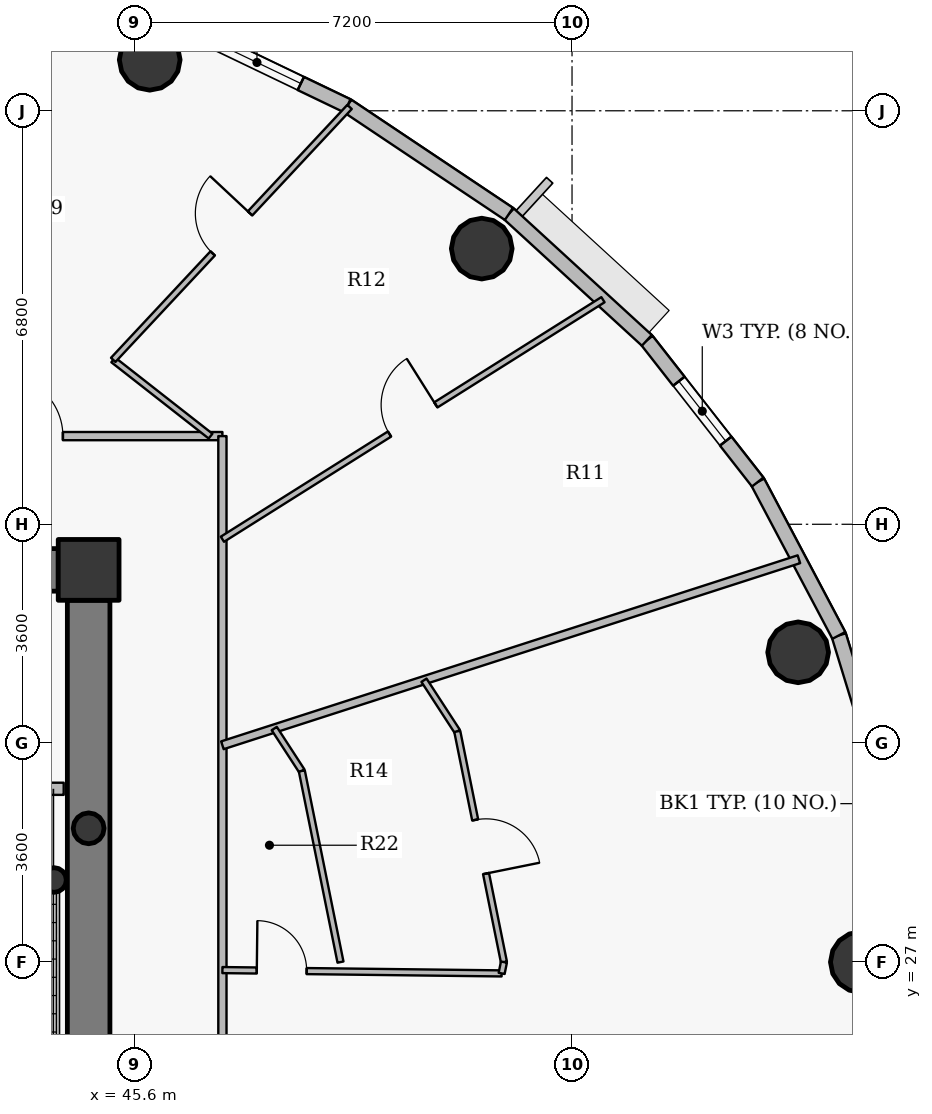
"""IFC4 building model, lengths in metres.
Left out: names, types, materials, properties, quantities, classifications, styles, units other than length and angle.
Written with IfcOpenShell. Run it as: python <this file> out.ifc"""

import sys

from ifc_helpers import new_model, si_unit, direction, frame, frame_2d, origin, origin_2d, place, context, subcontext, project, spatial, rectangle, hollow_circle, extrude, source, transform, mapped, element, fill, save


model = new_model("IFC4")
c1 = context("Model", 3, precision=1e-05, world=origin(), true_north=direction((0.0, 1.0)))
c2 = subcontext(c1, "Body", "Model", "MODEL_VIEW")
j1 = project(units=[si_unit("LENGTHUNIT", "METRE"), si_unit("PLANEANGLEUNIT", "RADIAN")], contexts=[c1])
p1 = place(None, origin())
s1 = spatial("IfcSite", under=j1, at=p1, CompositionType="ELEMENT")
p2 = place(p1, origin())
s2 = spatial("IfcBuilding", under=s1, at=p2, CompositionType="ELEMENT")
p3 = place(p2, frame((0.0, 0.0, 299.25)))
s3 = spatial("IfcBuildingStorey", under=s2, at=p3, CompositionType="ELEMENT", Elevation=299.25)
p4 = place(p3, frame((44.85, 33.45, 0.0), z_axis=(0.0, 0.0, 1.0), x_axis=(1.0, 0.0, 0.0)))
e1 = element("IfcColumn", 1, at=p4, inside=s3, PredefinedType="COLUMN", context=c2, shape_type="SweptSolid", body=[
    extrude(rectangle(XDim=1.0, YDim=1.0, at=origin_2d()), origin(), (0.0, 0.0, 1.0), 3.75),
])
p5 = place(p3, frame((44.28, 28.35, 0.0), z_axis=(0.0, 0.0, 1.0), x_axis=(1.0, 0.0, 0.0)))
e2 = element("IfcColumn", 2, at=p5, inside=s3, PredefinedType="COLUMN", context=c2, shape_type="SweptSolid", body=[
    extrude(hollow_circle(Radius=0.203, WallThickness=0.016, at=origin_2d()), origin(), (0.0, 0.0, 1.0), 3.75),
])
p6 = place(p3, frame((27.65, 33.45, 0.0), z_axis=(0.0, 0.0, 1.0), x_axis=(1.0, 0.0, 0.0)))
e3 = element("IfcWall", 3, at=p6, inside=s3, PredefinedType="SHEAR", context=c2, shape_type="SweptSolid", body=[
    extrude(rectangle(XDim=16.7, YDim=0.7, at=frame_2d((8.35, 0.0))), origin(), (0.0, 0.0, 1.0), 3.05),
])
p7 = place(p6, frame((12.775, 0.0, 0.0)))
e4 = element("IfcOpeningElement", 4, at=p7, cuts=e3, PredefinedType="OPENING", context=c2, shape_type="SweptSolid", body=[
    extrude(rectangle(XDim=1.15, YDim=2.15, at=origin_2d()), frame((0.575, 0.36, 1.075), z_axis=(0.0, -1.0, 0.0), x_axis=(1.0, 0.0, 0.0)), (0.0, 0.0, 1.0), 0.72),
])
p8 = place(p3, frame((44.85, 32.95, 0.0), z_axis=(0.0, 0.0, 1.0), x_axis=(0.0, -1.0, 0.0)))
e5 = element("IfcWall", 5, at=p8, inside=s3, PredefinedType="SHEAR", context=c2, shape_type="SweptSolid", body=[
    extrude(rectangle(XDim=11.9, YDim=0.7, at=frame_2d((5.95, 0.0))), origin(), (0.0, 0.0, 1.0), 3.05),
])
for number, where, z_axis, x_axis in (
    (6, (57.55, 27.0, 0.0), (0.0, 0.0, 1.0), (1.0, 0.0, 0.0)),
    (7, (56.519, 32.094, 0.0), (0.0, 0.0, 1.0), (1.0, 0.0, 0.0)),
    (8, (51.315, 38.733, 0.0), (0.0, 0.0, 1.0), (1.0, 0.0, 0.0)),
    (9, (45.854, 41.839, 0.0), (0.0, 0.0, 1.0), (1.0, 0.0, 0.0)),
):
    element("IfcColumn", number, at=place(p3, frame(where, z_axis=z_axis, x_axis=x_axis)), inside=s3, PredefinedType="COLUMN", context=c2, shape_type="SweptSolid", body=[
        extrude(hollow_circle(Radius=0.5, WallThickness=0.032, at=origin_2d()), origin(), (0.0, 0.0, 1.0), 3.75),
    ])
p9 = place(p3, frame((44.85, 29.2, 0.0), z_axis=(0.0, 0.0, 1.0), x_axis=(1.0, 0.0, 0.0)))
e10 = element("IfcColumn", 10, at=p9, inside=s3, PredefinedType="COLUMN", context=c2, shape_type="SweptSolid", body=[
    extrude(hollow_circle(Radius=0.254, WallThickness=0.02, at=origin_2d()), origin(), (0.0, 0.0, 1.0), 3.75),
])
p10 = place(p3, frame((57.188, 32.372, 0.0), z_axis=(0.0, 0.0, 1.0), x_axis=(0.2931213403, -0.956075248012, 0.0)))
e11 = element("IfcWall", 11, at=p10, inside=s3, PredefinedType="SOLIDWALL", context=c2, shape_type="SweptSolid", body=[
    extrude(rectangle(XDim=2.775, YDim=0.24, at=frame_2d((1.388, 0.0))), origin(), (0.0, 0.0, 1.0), 3.5),
])
p11 = place(p3, frame((55.854, 34.895, 0.0), z_axis=(0.0, 0.0, 1.0), x_axis=(0.467628269026, -0.883925224218, 0.0)))
e12 = element("IfcWall", 12, at=p11, inside=s3, PredefinedType="SOLIDWALL", context=c2, shape_type="SweptSolid", body=[
    extrude(rectangle(XDim=2.854, YDim=0.24, at=frame_2d((1.427, 0.0))), origin(), (0.0, 0.0, 1.0), 3.5),
])
p12 = place(p3, frame((54.03, 37.225, 0.0), z_axis=(0.0, 0.0, 1.0), x_axis=(0.616337186556, -0.787482363275, 0.0)))
e13 = element("IfcWall", 13, at=p12, inside=s3, PredefinedType="SOLIDWALL", context=c2, shape_type="SweptSolid", body=[
    extrude(rectangle(XDim=2.958, YDim=0.24, at=frame_2d((1.479, 0.0))), origin(), (0.0, 0.0, 1.0), 3.5),
])
p13 = place(p12, frame((0.854, 0.0, 0.9)))
e14 = element("IfcOpeningElement", 14, at=p13, cuts=e13, PredefinedType="OPENING", context=c2, shape_type="SweptSolid", body=[
    extrude(rectangle(XDim=1.25, YDim=1.65, at=origin_2d()), frame((0.625, 0.13, 0.825), z_axis=(0.0, -1.0, 0.0), x_axis=(1.0, 0.0, 0.0)), (0.0, 0.0, 1.0), 0.26),
])
p14 = place(p3, frame((51.762, 39.304, 0.0), z_axis=(0.0, 0.0, 1.0), x_axis=(0.737068506972, -0.675818034703, 0.0)))
e15 = element("IfcWall", 15, at=p14, inside=s3, PredefinedType="SOLIDWALL", context=c2, shape_type="SweptSolid", body=[
    extrude(rectangle(XDim=3.077, YDim=0.24, at=frame_2d((1.539, 0.0))), origin(), (0.0, 0.0, 1.0), 3.5),
])
p15 = place(p3, frame((49.104, 41.082, 0.0), z_axis=(0.0, 0.0, 1.0), x_axis=(0.831250592635, -0.55589787933, 0.0)))
e16 = element("IfcWall", 16, at=p15, inside=s3, PredefinedType="SOLIDWALL", context=c2, shape_type="SweptSolid", body=[
    extrude(rectangle(XDim=3.197, YDim=0.24, at=frame_2d((1.599, 0.0))), origin(), (0.0, 0.0, 1.0), 3.5),
])
p16 = place(p3, frame((46.123, 42.512, 0.0), z_axis=(0.0, 0.0, 1.0), x_axis=(0.901573741254, -0.43262546051, 0.0)))
e17 = element("IfcWall", 17, at=p16, inside=s3, PredefinedType="SOLIDWALL", context=c2, shape_type="SweptSolid", body=[
    extrude(rectangle(XDim=3.307, YDim=0.24, at=frame_2d((1.653, 0.0))), origin(), (0.0, 0.0, 1.0), 3.5),
])
p17 = place(p16, frame((0.858, 0.0, 0.9)))
e18 = element("IfcOpeningElement", 18, at=p17, cuts=e17, PredefinedType="OPENING", context=c2, shape_type="SweptSolid", body=[
    extrude(rectangle(XDim=1.6, YDim=1.75, at=origin_2d()), frame((0.8, 0.13, 0.875), z_axis=(0.0, -1.0, 0.0), x_axis=(1.0, 0.0, 0.0)), (0.0, 0.0, 1.0), 0.26),
])
p18 = place(p3, frame((35.95, 29.85, 0.0), z_axis=(0.0, 0.0, 1.0), x_axis=(1.0, 0.0, 0.0)))
e19 = element("IfcWall", 19, at=p18, inside=s3, PredefinedType="PARTITIONING", context=c2, shape_type="SweptSolid", body=[
    extrude(rectangle(XDim=8.49, YDim=0.2, at=frame_2d((4.245, 0.0))), origin(), (0.0, 0.0, 1.0), 3.085),
])
p19 = place(p18, frame((6.1, 0.0, 0.0)))
e20 = element("IfcOpeningElement", 20, at=p19, cuts=e19, PredefinedType="OPENING", context=c2, shape_type="SweptSolid", body=[
    extrude(rectangle(XDim=1.2, YDim=2.15, at=origin_2d()), frame((0.6, 0.11, 1.075), z_axis=(0.0, -1.0, 0.0), x_axis=(1.0, 0.0, 0.0)), (0.0, 0.0, 1.0), 0.22),
])
p20 = place(p18, frame((0.37, 0.0, 0.0)))
e21 = element("IfcOpeningElement", 21, at=p20, cuts=e19, PredefinedType="OPENING", context=c2, shape_type="SweptSolid", body=[
    extrude(rectangle(XDim=1.15, YDim=2.15, at=origin_2d()), frame((0.575, 0.11, 1.075), z_axis=(0.0, -1.0, 0.0), x_axis=(1.0, 0.0, 0.0)), (0.0, 0.0, 1.0), 0.22),
])
p21 = place(p18, frame((2.425, 0.0, 0.0)))
e22 = element("IfcOpeningElement", 22, at=p21, cuts=e19, PredefinedType="OPENING", context=c2, shape_type="SweptSolid", body=[
    extrude(rectangle(XDim=1.05, YDim=2.15, at=origin_2d()), frame((0.525, 0.11, 1.075), z_axis=(0.0, -1.0, 0.0), x_axis=(1.0, 0.0, 0.0)), (0.0, 0.0, 1.0), 0.22),
])
p22 = place(p3, frame((36.95, 35.65, 0.0), z_axis=(0.0, 0.0, 1.0), x_axis=(1.0, 0.0, 0.0)))
e23 = element("IfcWall", 23, at=p22, inside=s3, PredefinedType="PARTITIONING", context=c2, shape_type="SweptSolid", body=[
    extrude(rectangle(XDim=10.1, YDim=0.135, at=frame_2d((5.05, 0.0))), origin(), (0.0, 0.0, 1.0), 3.035),
])
p23 = place(p22, frame((6.477, 0.0, 0.0)))
e24 = element("IfcOpeningElement", 24, at=p23, cuts=e23, PredefinedType="OPENING", context=c2, shape_type="SweptSolid", body=[
    extrude(rectangle(XDim=1.0, YDim=2.15, at=origin_2d()), frame((0.5, 0.078, 1.075), z_axis=(0.0, -1.0, 0.0), x_axis=(1.0, 0.0, 0.0)), (0.0, 0.0, 1.0), 0.155),
])
p24 = place(p3, frame((45.254, 36.904, 0.0), z_axis=(0.0, 0.0, 1.0), x_axis=(0.787350433025, -0.616505714179, 0.0)))
e25 = element("IfcWall", 25, at=p24, inside=s3, PredefinedType="PARTITIONING", context=c2, shape_type="SweptSolid", body=[
    extrude(rectangle(XDim=2.033, YDim=0.1, at=frame_2d((1.017, 0.0))), origin(), (0.0, 0.0, 1.0), 3.5),
])
p25 = place(p3, frame((45.254, 36.904, 0.0), z_axis=(0.0, 0.0, 1.0), x_axis=(0.682727638106, 0.73067295842, 0.0)))
e26 = element("IfcWall", 26, at=p25, inside=s3, PredefinedType="PARTITIONING", context=c2, shape_type="SweptSolid", body=[
    extrude(rectangle(XDim=5.693, YDim=0.1, at=frame_2d((2.846, 0.0))), origin(), (0.0, 0.0, 1.0), 2.985),
])
p26 = place(p25, frame((2.396, 0.0, 0.0)))
e27 = element("IfcOpeningElement", 27, at=p26, cuts=e26, PredefinedType="OPENING", context=c2, shape_type="SweptSolid", body=[
    extrude(rectangle(XDim=0.9, YDim=2.1, at=origin_2d()), frame((0.45, 0.06, 1.05), z_axis=(0.0, -1.0, 0.0), x_axis=(1.0, 0.0, 0.0)), (0.0, 0.0, 1.0), 0.12),
])
p27 = place(p3, frame((47.05, 18.35, 0.0), z_axis=(0.0, 0.0, 1.0), x_axis=(0.0, 1.0, 0.0)))
e28 = element("IfcWall", 28, at=p27, inside=s3, PredefinedType="PARTITIONING", context=c2, shape_type="SweptSolid", body=[
    extrude(rectangle(XDim=17.3, YDim=0.135, at=frame_2d((8.65, 0.0))), origin(), (0.0, 0.0, 1.0), 3.035),
])
p28 = place(p27, frame((6.155, 0.0, 0.0)))
e29 = element("IfcOpeningElement", 29, at=p28, cuts=e28, PredefinedType="OPENING", context=c2, shape_type="SweptSolid", body=[
    extrude(rectangle(XDim=1.0, YDim=2.15, at=origin_2d()), frame((0.5, 0.078, 1.075), z_axis=(0.0, -1.0, 0.0), x_axis=(1.0, 0.0, 0.0)), (0.0, 0.0, 1.0), 0.155),
])
p29 = place(p3, frame((47.05, 26.869, 0.0), z_axis=(0.0, 0.0, 1.0), x_axis=(0.999929100649, -0.011907714968, 0.0)))
e30 = element("IfcWall", 30, at=p29, inside=s3, PredefinedType="PARTITIONING", context=c2, shape_type="SweptSolid", body=[
    extrude(rectangle(XDim=4.593, YDim=0.1, at=frame_2d((2.296, 0.0))), origin(), (0.0, 0.0, 1.0), 3.035),
])
p30 = place(p29, frame((0.565, 0.0, 0.0)))
e31 = element("IfcOpeningElement", 31, at=p30, cuts=e30, PredefinedType="OPENING", context=c2, shape_type="SweptSolid", body=[
    extrude(rectangle(XDim=0.82, YDim=2.1, at=origin_2d()), frame((0.41, 0.06, 1.05), z_axis=(0.0, -1.0, 0.0), x_axis=(1.0, 0.0, 0.0)), (0.0, 0.0, 1.0), 0.12),
])
p31 = place(p3, frame((47.05, 30.565, 0.0), z_axis=(0.0, 0.0, 1.0), x_axis=(0.951682976888, 0.307082255269, 0.0)))
e32 = element("IfcWall", 32, at=p31, inside=s3, PredefinedType="PARTITIONING", context=c2, shape_type="SweptSolid", body=[
    extrude(rectangle(XDim=9.963, YDim=0.135, at=frame_2d((4.981, 0.0))), origin(), (0.0, 0.0, 1.0), 2.985),
])
p32 = place(p3, frame((47.05, 33.954, 0.0), z_axis=(0.0, 0.0, 1.0), x_axis=(0.846339777122, 0.532643390704, 0.0)))
e33 = element("IfcWall", 33, at=p32, inside=s3, PredefinedType="PARTITIONING", context=c2, shape_type="SweptSolid", body=[
    extrude(rectangle(XDim=7.395, YDim=0.1, at=frame_2d((3.698, 0.0))), origin(), (0.0, 0.0, 1.0), 2.985),
])
p33 = place(p32, frame((3.248, 0.0, 0.0)))
e34 = element("IfcOpeningElement", 34, at=p33, cuts=e33, PredefinedType="OPENING", context=c2, shape_type="SweptSolid", body=[
    extrude(rectangle(XDim=0.9, YDim=2.1, at=origin_2d()), frame((0.45, 0.06, 1.05), z_axis=(0.0, -1.0, 0.0), x_axis=(1.0, 0.0, 0.0)), (0.0, 0.0, 1.0), 0.12),
])
p34 = place(p3, frame((47.903, 30.841, 0.0), z_axis=(0.0, 0.0, 1.0), x_axis=(0.545586849168, -0.838054288227, 0.0)))
e35 = element("IfcWall", 35, at=p34, inside=s3, PredefinedType="PARTITIONING", context=c2, shape_type="SweptSolid", body=[
    extrude(rectangle(XDim=0.832, YDim=0.1, at=frame_2d((0.416, 0.0))), origin(), (0.0, 0.0, 1.0), 3.035),
])
p35 = place(p3, frame((48.356, 30.144, 0.0), z_axis=(0.0, 0.0, 1.0), x_axis=(0.198208908342, -0.98015979751, 0.0)))
e36 = element("IfcWall", 36, at=p35, inside=s3, PredefinedType="PARTITIONING", context=c2, shape_type="SweptSolid", body=[
    extrude(rectangle(XDim=3.208, YDim=0.1, at=frame_2d((1.604, 0.0))), origin(), (0.0, 0.0, 1.0), 3.035),
])
p36 = place(p3, frame((50.365, 31.635, 0.0), z_axis=(0.0, 0.0, 1.0), x_axis=(0.545458599095, -0.83813776712, 0.0)))
e37 = element("IfcWall", 37, at=p36, inside=s3, PredefinedType="PARTITIONING", context=c2, shape_type="SweptSolid", body=[
    extrude(rectangle(XDim=1.003, YDim=0.1, at=frame_2d((0.502, 0.0))), origin(), (0.0, 0.0, 1.0), 3.035),
])
p37 = place(p3, frame((50.913, 30.794, 0.0), z_axis=(0.0, 0.0, 1.0), x_axis=(0.198226068862, -0.980156327135, 0.0)))
e38 = element("IfcWall", 38, at=p37, inside=s3, PredefinedType="PARTITIONING", context=c2, shape_type="SweptSolid", body=[
    extrude(rectangle(XDim=3.871, YDim=0.1, at=frame_2d((1.936, 0.0))), origin(), (0.0, 0.0, 1.0), 3.035),
])
p38 = place(p37, frame((1.486, 0.0, 0.0)))
e39 = element("IfcOpeningElement", 39, at=p38, cuts=e38, PredefinedType="OPENING", context=c2, shape_type="SweptSolid", body=[
    extrude(rectangle(XDim=0.9, YDim=2.1, at=origin_2d()), frame((0.45, 0.06, 1.05), z_axis=(0.0, -1.0, 0.0), x_axis=(1.0, 0.0, 0.0)), (0.0, 0.0, 1.0), 0.12),
])
p39 = place(p3, frame((51.642, 26.814, 0.0), z_axis=(0.0, 0.0, 1.0), x_axis=(0.198094703821, 0.980182885138, 0.0)))
e40 = element("IfcWall", 40, at=p39, inside=s3, PredefinedType="PARTITIONING", context=c2, shape_type="SweptSolid", body=[
    extrude(rectangle(XDim=0.19, YDim=0.1, at=frame_2d((0.095, 0.0))), origin(), (0.0, 0.0, 1.0), 3.035),
])
p40 = place(p3, frame((45.2, 33.8, 0.0), z_axis=(0.0, 0.0, 1.0), x_axis=(-1.0, 0.0, 0.0)))
e41 = element("IfcWall", 41, at=p40, inside=s3, PredefinedType="PARTITIONING", context=c2, shape_type="SweptSolid", body=[
    extrude(rectangle(XDim=0.84, YDim=0.135, at=frame_2d((0.42, 0.0))), origin(), (0.0, 0.0, 1.0), 3.035),
])
p41 = place(p3, frame((45.2, 32.96, 0.0), z_axis=(0.0, 0.0, 1.0), x_axis=(0.0, 1.0, 0.0)))
e42 = element("IfcWall", 42, at=p41, inside=s3, PredefinedType="PARTITIONING", context=c2, shape_type="SweptSolid", body=[
    extrude(rectangle(XDim=0.532, YDim=0.135, at=frame_2d((0.266, 0.0))), origin(), (0.0, 0.0, 1.0), 3.5),
])
m1 = source(origin(), c2, "Body", "SweptSolid", [
    extrude(rectangle(XDim=1.25, YDim=1.65, at=origin_2d()), frame((0.625, 0.03, 0.825), z_axis=(0.0, -1.0, 0.0), x_axis=(1.0, 0.0, 0.0)), (0.0, 0.0, 1.0), 0.06),
])
p42 = place(p13, origin())
e43 = element("IfcWindow", 43, at=p42, inside=s3, PartitioningType="SINGLE_PANEL", PredefinedType="WINDOW", context=c2, shape_type="MappedRepresentation", body=[
    mapped(m1, transform((0.0, 0.0, 0.0), x_axis=(1.0, 0.0, 0.0), y_axis=(0.0, 1.0, 0.0), z_axis=(0.0, 0.0, 1.0), scale=1.0)),
])
fill(e14, e43)
m2 = source(origin(), c2, "Body", "SweptSolid", [
    extrude(rectangle(XDim=1.6, YDim=1.75, at=origin_2d()), frame((0.8, 0.03, 0.875), z_axis=(0.0, -1.0, 0.0), x_axis=(1.0, 0.0, 0.0)), (0.0, 0.0, 1.0), 0.06),
])
p43 = place(p17, origin())
e44 = element("IfcWindow", 44, at=p43, inside=s3, PartitioningType="DOUBLE_PANEL_VERTICAL", PredefinedType="WINDOW", context=c2, shape_type="MappedRepresentation", body=[
    mapped(m2, transform((0.0, 0.0, 0.0), x_axis=(1.0, 0.0, 0.0), y_axis=(0.0, 1.0, 0.0), z_axis=(0.0, 0.0, 1.0), scale=1.0)),
])
fill(e18, e44)
m3 = source(origin(), c2, "Body", "SweptSolid", [
    extrude(rectangle(XDim=0.82, YDim=2.1, at=origin_2d()), frame((0.41, 0.025, 1.05), z_axis=(0.0, -1.0, 0.0), x_axis=(1.0, 0.0, 0.0)), (0.0, 0.0, 1.0), 0.05),
])
p44 = place(p30, origin())
e45 = element("IfcDoor", 45, at=p44, inside=s3, OperationType="SINGLE_SWING_LEFT", PredefinedType="DOOR", context=c2, shape_type="MappedRepresentation", body=[
    mapped(m3, transform((0.0, 0.0, 0.0), x_axis=(1.0, 0.0, 0.0), y_axis=(0.0, 1.0, 0.0), z_axis=(0.0, 0.0, 1.0), scale=1.0)),
])
fill(e31, e45)
m4 = source(origin(), c2, "Body", "SweptSolid", [
    extrude(rectangle(XDim=0.9, YDim=2.1, at=origin_2d()), frame((0.45, 0.025, 1.05), z_axis=(0.0, -1.0, 0.0), x_axis=(1.0, 0.0, 0.0)), (0.0, 0.0, 1.0), 0.05),
])
p45 = place(p38, origin())
e46 = element("IfcDoor", 46, at=p45, inside=s3, OperationType="SINGLE_SWING_RIGHT", PredefinedType="DOOR", context=c2, shape_type="MappedRepresentation", body=[
    mapped(m4, transform((0.0, 0.0, 0.0), x_axis=(1.0, 0.0, 0.0), y_axis=(0.0, 1.0, 0.0), z_axis=(0.0, 0.0, 1.0), scale=1.0)),
])
fill(e39, e46)
m5 = source(origin(), c2, "Body", "SweptSolid", [
    extrude(rectangle(XDim=1.0, YDim=2.15, at=origin_2d()), frame((0.5, 0.025, 1.075), z_axis=(0.0, -1.0, 0.0), x_axis=(1.0, 0.0, 0.0)), (0.0, 0.0, 1.0), 0.05),
])
p46 = place(p23, origin())
e47 = element("IfcDoor", 47, at=p46, inside=s3, OperationType="SINGLE_SWING_LEFT", PredefinedType="DOOR", context=c2, shape_type="MappedRepresentation", body=[
    mapped(m5, transform((0.0, 0.0, 0.0), x_axis=(1.0, 0.0, 0.0), y_axis=(0.0, 1.0, 0.0), z_axis=(0.0, 0.0, 1.0), scale=1.0)),
])
fill(e24, e47)
p47 = place(p26, origin())
e48 = element("IfcDoor", 48, at=p47, inside=s3, OperationType="SINGLE_SWING_RIGHT", PredefinedType="DOOR", context=c2, shape_type="MappedRepresentation", body=[
    mapped(m4, transform((0.0, 0.0, 0.0), x_axis=(1.0, 0.0, 0.0), y_axis=(0.0, 1.0, 0.0), z_axis=(0.0, 0.0, 1.0), scale=1.0)),
])
fill(e27, e48)
p48 = place(p33, origin())
e49 = element("IfcDoor", 49, at=p48, inside=s3, OperationType="SINGLE_SWING_RIGHT", PredefinedType="DOOR", context=c2, shape_type="MappedRepresentation", body=[
    mapped(m4, transform((0.0, 0.0, 0.0), x_axis=(1.0, 0.0, 0.0), y_axis=(0.0, 1.0, 0.0), z_axis=(0.0, 0.0, 1.0), scale=1.0)),
])
fill(e34, e49)
save(model, sys.argv[1])
